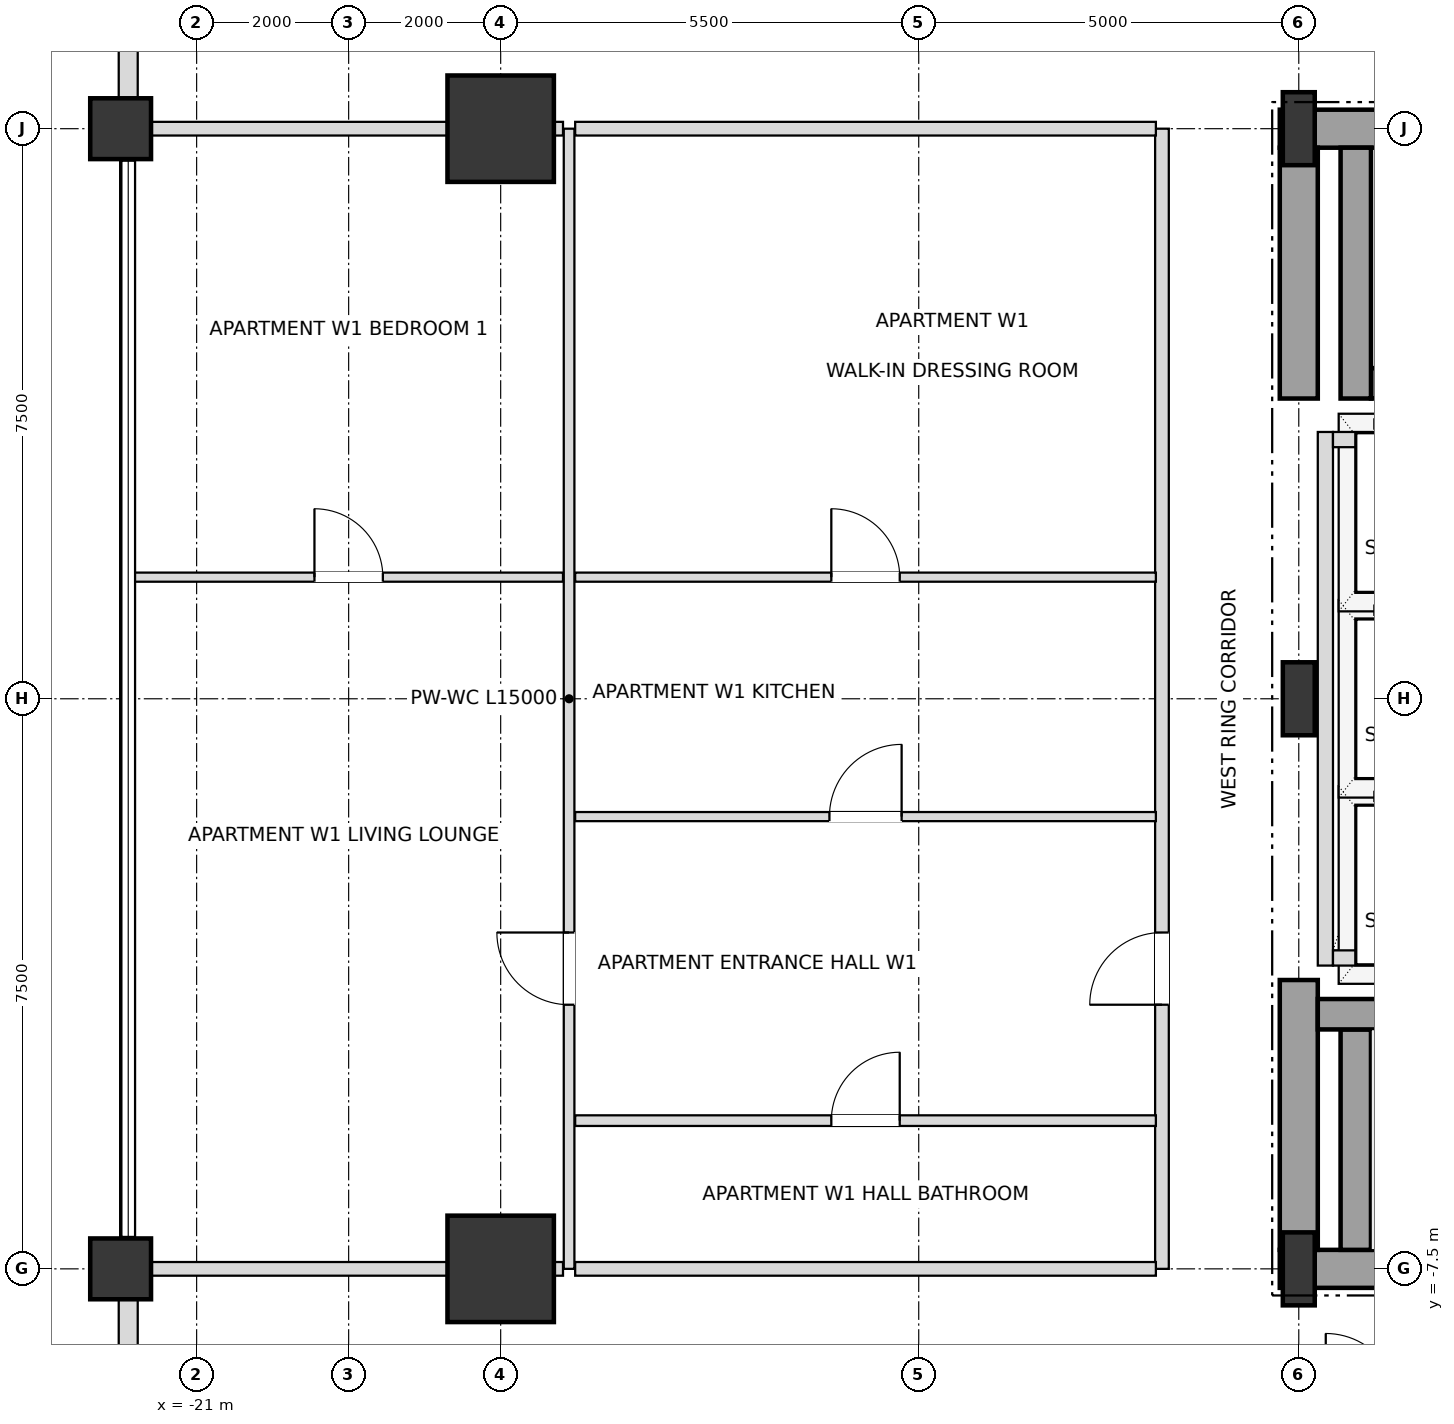
"""IFC4 building model, lengths in metres.
Left out: names, types, materials, properties, quantities, classifications, styles, units other than length and angle.
Written with IfcOpenShell. Run it as: python <this file> out.ifc"""

import sys

from ifc_helpers import new_model, si_unit, direction, frame, frame_2d, origin, origin_2d, place, context, subcontext, project, spatial, rectangle, i_section, extrude, element, fill, save


model = new_model("IFC4")
c1 = context("Model", 3, precision=1e-05, world=origin(), true_north=direction((0.0, 1.0)))
c2 = subcontext(c1, "Body", "Model", "MODEL_VIEW")
j1 = project(units=[si_unit("LENGTHUNIT", "METRE"), si_unit("PLANEANGLEUNIT", "RADIAN")], contexts=[c1])
p1 = place(None, origin())
s1 = spatial("IfcSite", under=j1, at=p1, CompositionType="ELEMENT")
p2 = place(p1, origin())
s2 = spatial("IfcBuilding", under=s1, at=p2, CompositionType="ELEMENT")
p3 = place(p2, frame((0.0, 0.0, 43.2)))
s3 = spatial("IfcBuildingStorey", under=s2, at=p3, CompositionType="ELEMENT", Elevation=43.2)
for number, where, z_axis, x_axis in (
    (1, (-6.5, -7.5, 0.0), (0.0, 0.0, 1.0), (1.0, 0.0, 0.0)),
    (2, (-6.5, 0.0, 0.0), (0.0, 0.0, 1.0), (1.0, 0.0, 0.0)),
    (3, (-6.5, 7.5, 0.0), (0.0, 0.0, 1.0), (1.0, 0.0, 0.0)),
):
    element("IfcColumn", number, at=place(p3, frame(where, z_axis=z_axis, x_axis=x_axis)), inside=s3, PredefinedType="COLUMN", context=c2, shape_type="SweptSolid", body=[
        extrude(i_section(OverallWidth=0.42, OverallDepth=0.96, WebThickness=0.022, FlangeThickness=0.034, at=origin_2d()), origin(), (0.0, 0.0, 1.0), 3.6),
    ])
for number, where, z_axis, x_axis in (
    (4, (-17.0, 7.5, 0.0), (0.0, 0.0, 1.0), (1.0, 0.0, 0.0)),
    (5, (-17.0, -7.5, 0.0), (0.0, 0.0, 1.0), (1.0, 0.0, 0.0)),
):
    element("IfcColumn", number, at=place(p3, frame(where, z_axis=z_axis, x_axis=x_axis)), inside=s3, PredefinedType="USERDEFINED", context=c2, shape_type="SweptSolid", body=[
        extrude(rectangle(XDim=1.4, YDim=1.4, at=origin_2d()), origin(), (0.0, 0.0, 1.0), 3.6),
    ])
for number, where, z_axis, x_axis in (
    (6, (-22.0, -7.5, 0.0), (0.0, 0.0, 1.0), (1.0, 0.0, 0.0)),
    (7, (-22.0, 7.5, 0.0), (0.0, 0.0, 1.0), (1.0, 0.0, 0.0)),
):
    element("IfcColumn", number, at=place(p3, frame(where, z_axis=z_axis, x_axis=x_axis)), inside=s3, PredefinedType="COLUMN", context=c2, shape_type="SweptSolid", body=[
        extrude(rectangle(XDim=0.8, YDim=0.8, at=origin_2d()), origin(), (0.0, 0.0, 1.0), 3.6),
    ])
p4 = place(p3, frame((-21.9, 12.605, 0.0), z_axis=(0.0, 0.0, 1.0), x_axis=(0.0, -1.0, 0.0)))
e8 = element("IfcWall", 8, at=p4, inside=s3, PredefinedType="SOLIDWALL", context=c2, shape_type="SweptSolid", body=[
    extrude(rectangle(XDim=4.71, YDim=0.25, at=frame_2d((2.355, 0.0))), origin(), (0.0, 0.0, 1.0), 2.736),
])
p5 = place(p4, frame((1.455, 0.0, 0.72)))
e9 = element("IfcOpeningElement", 9, at=p5, cuts=e8, PredefinedType="OPENING", context=c2, shape_type="SweptSolid", body=[
    extrude(rectangle(XDim=1.8, YDim=1.68, at=frame_2d((0.9, 0.84))), frame((0.0, 0.135, 0.0), z_axis=(0.0, -1.0, 0.0), x_axis=(1.0, 0.0, 0.0)), (0.0, 0.0, 1.0), 0.27),
])
p6 = place(p3, frame((-21.9, -7.895, 0.0), z_axis=(0.0, 0.0, 1.0), x_axis=(0.0, -1.0, 0.0)))
e10 = element("IfcWall", 10, at=p6, inside=s3, PredefinedType="SOLIDWALL", context=c2, shape_type="SweptSolid", body=[
    extrude(rectangle(XDim=4.71, YDim=0.25, at=frame_2d((2.355, 0.0))), origin(), (0.0, 0.0, 1.0), 2.736),
])
p7 = place(p6, frame((1.455, 0.0, 0.72)))
e11 = element("IfcOpeningElement", 11, at=p7, cuts=e10, PredefinedType="OPENING", context=c2, shape_type="SweptSolid", body=[
    extrude(rectangle(XDim=1.8, YDim=1.68, at=frame_2d((0.9, 0.84))), frame((0.0, 0.135, 0.0), z_axis=(0.0, -1.0, 0.0), x_axis=(1.0, 0.0, 0.0)), (0.0, 0.0, 1.0), 0.27),
])
p8 = place(p3, frame((-6.75, -7.5, 0.0), z_axis=(0.0, 0.0, 1.0), x_axis=(1.0, 0.0, 0.0)))
e12 = element("IfcWall", 12, at=p8, inside=s3, PredefinedType="SHEAR", context=c2, shape_type="SweptSolid", body=[
    extrude(rectangle(XDim=6.75, YDim=0.5, at=frame_2d((3.375, 0.0))), origin(), (0.0, 0.0, 1.0), 3.38),
])
p9 = place(p3, frame((-6.75, 7.5, 0.0), z_axis=(0.0, 0.0, 1.0), x_axis=(1.0, 0.0, 0.0)))
e13 = element("IfcWall", 13, at=p9, inside=s3, PredefinedType="SHEAR", context=c2, shape_type="SweptSolid", body=[
    extrude(rectangle(XDim=6.75, YDim=0.5, at=frame_2d((3.375, 0.0))), origin(), (0.0, 0.0, 1.0), 3.38),
])
p10 = place(p9, frame((1.65, 0.0, 0.0)))
e14 = element("IfcOpeningElement", 14, at=p10, cuts=e13, PredefinedType="OPENING", context=c2, shape_type="SweptSolid", body=[
    extrude(rectangle(XDim=1.05, YDim=2.15, at=frame_2d((0.525, 1.075))), frame((0.0, 0.26, 0.0), z_axis=(0.0, -1.0, 0.0), x_axis=(1.0, 0.0, 0.0)), (0.0, 0.0, 1.0), 0.52),
])
p11 = place(p3, frame((-6.5, -7.25, 0.0), z_axis=(0.0, 0.0, 1.0), x_axis=(0.0, 1.0, 0.0)))
e15 = element("IfcWall", 15, at=p11, inside=s3, PredefinedType="SHEAR", context=c2, shape_type="SweptSolid", body=[
    extrude(rectangle(XDim=3.55, YDim=0.5, at=frame_2d((1.775, 0.0))), origin(), (0.0, 0.0, 1.0), 3.38),
])
p12 = place(p3, frame((-6.5, 3.95, 0.0), z_axis=(0.0, 0.0, 1.0), x_axis=(0.0, 1.0, 0.0)))
e16 = element("IfcWall", 16, at=p12, inside=s3, PredefinedType="SHEAR", context=c2, shape_type="SweptSolid", body=[
    extrude(rectangle(XDim=3.3, YDim=0.5, at=frame_2d((1.65, 0.0))), origin(), (0.0, 0.0, 1.0), 3.38),
])
p13 = place(p3, frame((-5.75, -7.25, 0.0), z_axis=(0.0, 0.0, 1.0), x_axis=(0.0, 1.0, 0.0)))
e17 = element("IfcWall", 17, at=p13, inside=s3, PredefinedType="SHEAR", context=c2, shape_type="SweptSolid", body=[
    extrude(rectangle(XDim=2.9, YDim=0.4, at=frame_2d((1.45, 0.0))), origin(), (0.0, 0.0, 1.0), 3.38),
])
p14 = place(p3, frame((-6.25, -4.15, 0.0), z_axis=(0.0, 0.0, 1.0), x_axis=(1.0, 0.0, 0.0)))
e18 = element("IfcWall", 18, at=p14, inside=s3, PredefinedType="SHEAR", context=c2, shape_type="SweptSolid", body=[
    extrude(rectangle(XDim=7.78, YDim=0.4, at=frame_2d((3.89, 0.0))), origin(), (0.0, 0.0, 1.0), 3.38),
])
p15 = place(p3, frame((-5.55, 4.15, 0.0), z_axis=(0.0, 0.0, 1.0), x_axis=(1.0, 0.0, 0.0)))
e19 = element("IfcWall", 19, at=p15, inside=s3, PredefinedType="SHEAR", context=c2, shape_type="SweptSolid", body=[
    extrude(rectangle(XDim=7.08, YDim=0.4, at=frame_2d((3.54, 0.0))), origin(), (0.0, 0.0, 1.0), 3.38),
])
p16 = place(p3, frame((-5.75, 3.95, 0.0), z_axis=(0.0, 0.0, 1.0), x_axis=(0.0, 1.0, 0.0)))
e20 = element("IfcWall", 20, at=p16, inside=s3, PredefinedType="SHEAR", context=c2, shape_type="SweptSolid", body=[
    extrude(rectangle(XDim=3.3, YDim=0.4, at=frame_2d((1.65, 0.0))), origin(), (0.0, 0.0, 1.0), 3.38),
])
p17 = place(p3, frame((-6.15, -3.51, 0.0), z_axis=(0.0, 0.0, 1.0), x_axis=(0.0, 1.0, 0.0)))
e21 = element("IfcWall", 21, at=p17, inside=s3, PredefinedType="SOLIDWALL", context=c2, shape_type="SweptSolid", body=[
    extrude(rectangle(XDim=7.02, YDim=0.2, at=frame_2d((3.51, 0.0))), origin(), (0.0, 0.0, 1.0), 3.38),
])
for number, where, z_axis, x_axis in (
    (22, (-6.05, -3.41, 0.0), (0.0, 0.0, 1.0), (1.0, 0.0, 0.0)),
    (23, (-6.05, 3.41, 0.0), (0.0, 0.0, 1.0), (1.0, 0.0, 0.0)),
):
    element("IfcWall", number, at=place(p3, frame(where, z_axis=z_axis, x_axis=x_axis)), inside=s3, PredefinedType="SOLIDWALL", context=c2, shape_type="SweptSolid", body=[
        extrude(rectangle(XDim=2.2, YDim=0.2, at=frame_2d((1.1, 0.0))), origin(), (0.0, 0.0, 1.0), 3.38),
    ])
p18 = place(p3, frame((-16.1, -7.5, 0.0), z_axis=(0.0, 0.0, 1.0), x_axis=(0.0, 1.0, 0.0)))
e24 = element("IfcWall", 24, at=p18, inside=s3, PredefinedType="PARTITIONING", context=c2, shape_type="SweptSolid", body=[
    extrude(rectangle(XDim=15.0, YDim=0.14, at=frame_2d((7.5, 0.0))), origin(), (0.0, 0.0, 1.0), 3.38),
])
p19 = place(p18, frame((3.475, 0.0, 0.0)))
e25 = element("IfcOpeningElement", 25, at=p19, cuts=e24, PredefinedType="OPENING", context=c2, shape_type="SweptSolid", body=[
    extrude(rectangle(XDim=0.95, YDim=2.1, at=frame_2d((0.475, 1.05))), frame((0.0, 0.08, 0.0), z_axis=(0.0, -1.0, 0.0), x_axis=(1.0, 0.0, 0.0)), (0.0, 0.0, 1.0), 0.16),
])
p20 = place(p3, frame((-8.3, -7.5, 0.0), z_axis=(0.0, 0.0, 1.0), x_axis=(0.0, 1.0, 0.0)))
e26 = element("IfcWall", 26, at=p20, inside=s3, PredefinedType="PARTITIONING", context=c2, shape_type="SweptSolid", body=[
    extrude(rectangle(XDim=15.0, YDim=0.18, at=frame_2d((7.5, 0.0))), origin(), (0.0, 0.0, 1.0), 3.38),
])
p21 = place(p20, frame((3.475, 0.0, 0.0)))
e27 = element("IfcOpeningElement", 27, at=p21, cuts=e26, PredefinedType="OPENING", context=c2, shape_type="SweptSolid", body=[
    extrude(rectangle(XDim=0.95, YDim=2.15, at=frame_2d((0.475, 1.075))), frame((0.0, 0.1, 0.0), z_axis=(0.0, -1.0, 0.0), x_axis=(1.0, 0.0, 0.0)), (0.0, 0.0, 1.0), 0.2),
])
p22 = place(p3, frame((-21.9, -7.5, 0.0), z_axis=(0.0, 0.0, 1.0), x_axis=(1.0, 0.0, 0.0)))
e28 = element("IfcWall", 28, at=p22, inside=s3, PredefinedType="PARTITIONING", context=c2, shape_type="SweptSolid", body=[
    extrude(rectangle(XDim=5.72, YDim=0.18, at=frame_2d((2.86, 0.0))), origin(), (0.0, 0.0, 1.0), 2.816),
])
p23 = place(p3, frame((-16.02, -7.5, 0.0), z_axis=(0.0, 0.0, 1.0), x_axis=(1.0, 0.0, 0.0)))
e29 = element("IfcWall", 29, at=p23, inside=s3, PredefinedType="PARTITIONING", context=c2, shape_type="SweptSolid", body=[
    extrude(rectangle(XDim=7.64, YDim=0.18, at=frame_2d((3.82, 0.0))), origin(), (0.0, 0.0, 1.0), 2.816),
])
p24 = place(p3, frame((-16.02, -5.55, 0.0), z_axis=(0.0, 0.0, 1.0), x_axis=(1.0, 0.0, 0.0)))
e30 = element("IfcWall", 30, at=p24, inside=s3, PredefinedType="PARTITIONING", context=c2, shape_type="SweptSolid", body=[
    extrude(rectangle(XDim=7.64, YDim=0.14, at=frame_2d((3.82, 0.0))), origin(), (0.0, 0.0, 1.0), 2.948),
])
p25 = place(p24, frame((3.37, 0.0, 0.0)))
e31 = element("IfcOpeningElement", 31, at=p25, cuts=e30, PredefinedType="OPENING", context=c2, shape_type="SweptSolid", body=[
    extrude(rectangle(XDim=0.9, YDim=2.1, at=frame_2d((0.45, 1.05))), frame((0.0, 0.08, 0.0), z_axis=(0.0, -1.0, 0.0), x_axis=(1.0, 0.0, 0.0)), (0.0, 0.0, 1.0), 0.16),
])
p26 = place(p3, frame((-16.02, -1.55, 0.0), z_axis=(0.0, 0.0, 1.0), x_axis=(1.0, 0.0, 0.0)))
e32 = element("IfcWall", 32, at=p26, inside=s3, PredefinedType="PARTITIONING", context=c2, shape_type="SweptSolid", body=[
    extrude(rectangle(XDim=7.64, YDim=0.12, at=frame_2d((3.82, 0.0))), origin(), (0.0, 0.0, 1.0), 2.948),
])
p27 = place(p26, frame((3.345, 0.0, 0.0)))
e33 = element("IfcOpeningElement", 33, at=p27, cuts=e32, PredefinedType="OPENING", context=c2, shape_type="SweptSolid", body=[
    extrude(rectangle(XDim=0.95, YDim=2.1, at=frame_2d((0.475, 1.05))), frame((0.0, 0.07, 0.0), z_axis=(0.0, -1.0, 0.0), x_axis=(1.0, 0.0, 0.0)), (0.0, 0.0, 1.0), 0.14),
])
p28 = place(p3, frame((-21.82, 1.6, 0.0), z_axis=(0.0, 0.0, 1.0), x_axis=(1.0, 0.0, 0.0)))
e34 = element("IfcWall", 34, at=p28, inside=s3, PredefinedType="PARTITIONING", context=c2, shape_type="SweptSolid", body=[
    extrude(rectangle(XDim=5.64, YDim=0.12, at=frame_2d((2.82, 0.0))), origin(), (0.0, 0.0, 1.0), 2.816),
])
p29 = place(p28, frame((2.37, 0.0, 0.0)))
e35 = element("IfcOpeningElement", 35, at=p29, cuts=e34, PredefinedType="OPENING", context=c2, shape_type="SweptSolid", body=[
    extrude(rectangle(XDim=0.9, YDim=2.1, at=frame_2d((0.45, 1.05))), frame((0.0, 0.07, 0.0), z_axis=(0.0, -1.0, 0.0), x_axis=(1.0, 0.0, 0.0)), (0.0, 0.0, 1.0), 0.14),
])
p30 = place(p3, frame((-16.02, 1.6, 0.0), z_axis=(0.0, 0.0, 1.0), x_axis=(1.0, 0.0, 0.0)))
e36 = element("IfcWall", 36, at=p30, inside=s3, PredefinedType="PARTITIONING", context=c2, shape_type="SweptSolid", body=[
    extrude(rectangle(XDim=7.64, YDim=0.12, at=frame_2d((3.82, 0.0))), origin(), (0.0, 0.0, 1.0), 2.948),
])
p31 = place(p30, frame((3.37, 0.0, 0.0)))
e37 = element("IfcOpeningElement", 37, at=p31, cuts=e36, PredefinedType="OPENING", context=c2, shape_type="SweptSolid", body=[
    extrude(rectangle(XDim=0.9, YDim=2.1, at=frame_2d((0.45, 1.05))), frame((0.0, 0.07, 0.0), z_axis=(0.0, -1.0, 0.0), x_axis=(1.0, 0.0, 0.0)), (0.0, 0.0, 1.0), 0.14),
])
p32 = place(p3, frame((-21.9, 7.5, 0.0), z_axis=(0.0, 0.0, 1.0), x_axis=(1.0, 0.0, 0.0)))
e38 = element("IfcWall", 38, at=p32, inside=s3, PredefinedType="PARTITIONING", context=c2, shape_type="SweptSolid", body=[
    extrude(rectangle(XDim=5.72, YDim=0.18, at=frame_2d((2.86, 0.0))), origin(), (0.0, 0.0, 1.0), 2.816),
])
p33 = place(p3, frame((-16.02, 7.5, 0.0), z_axis=(0.0, 0.0, 1.0), x_axis=(1.0, 0.0, 0.0)))
e39 = element("IfcWall", 39, at=p33, inside=s3, PredefinedType="PARTITIONING", context=c2, shape_type="SweptSolid", body=[
    extrude(rectangle(XDim=7.64, YDim=0.18, at=frame_2d((3.82, 0.0))), origin(), (0.0, 0.0, 1.0), 2.816),
])
p34 = place(p25, origin())
e40 = element("IfcDoor", 40, at=p34, inside=s3, OperationType="SINGLE_SWING_RIGHT", PredefinedType="DOOR", context=c2, shape_type="SweptSolid", body=[
    extrude(rectangle(XDim=0.9, YDim=2.1, at=frame_2d((0.45, 1.05))), frame((0.0, 0.025, 0.0), z_axis=(0.0, -1.0, 0.0), x_axis=(1.0, 0.0, 0.0)), (0.0, 0.0, 1.0), 0.05),
])
fill(e31, e40)
p35 = place(p21, origin())
e41 = element("IfcDoor", 41, at=p35, inside=s3, OperationType="SINGLE_SWING_LEFT", PredefinedType="DOOR", context=c2, shape_type="SweptSolid", body=[
    extrude(rectangle(XDim=0.95, YDim=2.15, at=frame_2d((0.475, 1.075))), frame((0.0, 0.025, 0.0), z_axis=(0.0, -1.0, 0.0), x_axis=(1.0, 0.0, 0.0)), (0.0, 0.0, 1.0), 0.05),
])
fill(e27, e41)
p36 = place(p27, origin())
e42 = element("IfcDoor", 42, at=p36, inside=s3, OperationType="SINGLE_SWING_RIGHT", PredefinedType="DOOR", context=c2, shape_type="SweptSolid", body=[
    extrude(rectangle(XDim=0.95, YDim=2.1, at=frame_2d((0.475, 1.05))), frame((0.0, 0.025, 0.0), z_axis=(0.0, -1.0, 0.0), x_axis=(1.0, 0.0, 0.0)), (0.0, 0.0, 1.0), 0.05),
])
fill(e33, e42)
p37 = place(p31, origin())
e43 = element("IfcDoor", 43, at=p37, inside=s3, OperationType="SINGLE_SWING_LEFT", PredefinedType="DOOR", context=c2, shape_type="SweptSolid", body=[
    extrude(rectangle(XDim=0.9, YDim=2.1, at=frame_2d((0.45, 1.05))), frame((0.0, 0.025, 0.0), z_axis=(0.0, -1.0, 0.0), x_axis=(1.0, 0.0, 0.0)), (0.0, 0.0, 1.0), 0.05),
])
fill(e37, e43)
p38 = place(p19, origin())
e44 = element("IfcDoor", 44, at=p38, inside=s3, OperationType="SINGLE_SWING_RIGHT", PredefinedType="DOOR", context=c2, shape_type="SweptSolid", body=[
    extrude(rectangle(XDim=0.95, YDim=2.1, at=frame_2d((0.475, 1.05))), frame((0.0, 0.025, 0.0), z_axis=(0.0, -1.0, 0.0), x_axis=(1.0, 0.0, 0.0)), (0.0, 0.0, 1.0), 0.05),
])
fill(e25, e44)
p39 = place(p29, origin())
e45 = element("IfcDoor", 45, at=p39, inside=s3, OperationType="SINGLE_SWING_LEFT", PredefinedType="DOOR", context=c2, shape_type="SweptSolid", body=[
    extrude(rectangle(XDim=0.9, YDim=2.1, at=frame_2d((0.45, 1.05))), frame((0.0, 0.025, 0.0), z_axis=(0.0, -1.0, 0.0), x_axis=(1.0, 0.0, 0.0)), (0.0, 0.0, 1.0), 0.05),
])
fill(e35, e45)
save(model, sys.argv[1])
